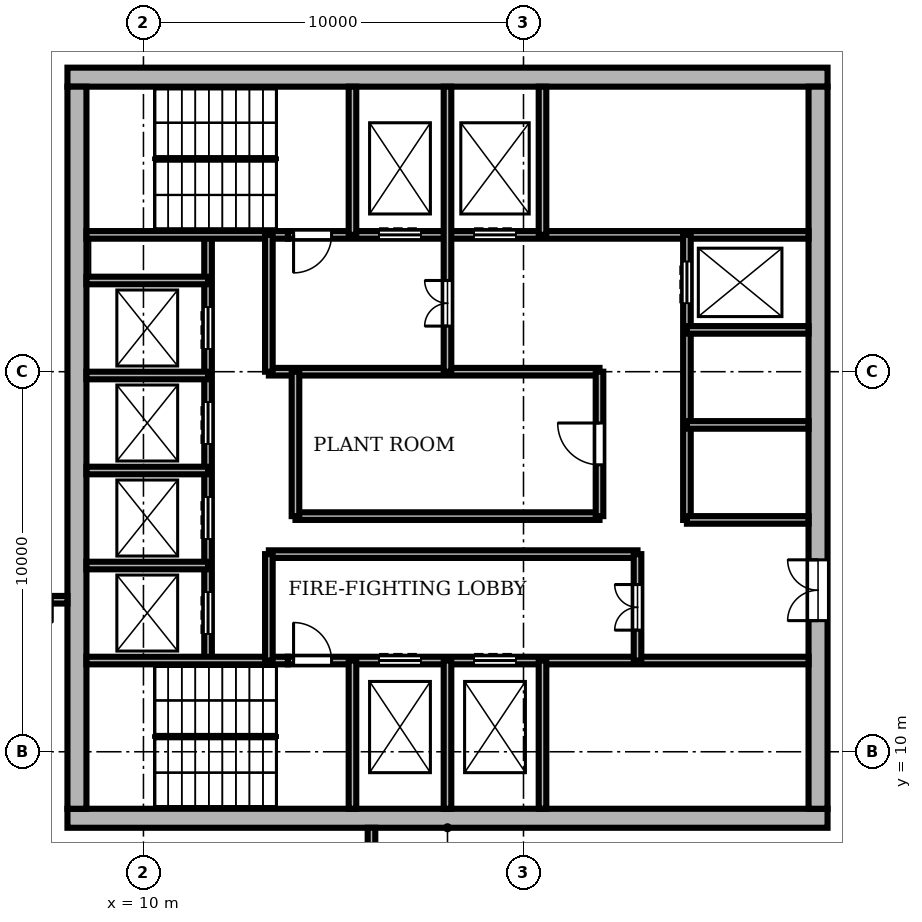
"""IFC4 building model, lengths in metres.
Left out: names, types, materials, properties, quantities, classifications, styles, units other than length and angle.
Written with IfcOpenShell. Run it as: python <this file> out.ifc"""

import sys

from ifc_helpers import new_model, si_unit, direction, frame, frame_2d, origin, place, context, subcontext, project, spatial, rectangle, extrude, element, fill, save


model = new_model("IFC4")
c1 = context("Model", 3, precision=1e-05, world=origin(), true_north=direction((0.0, 1.0)))
c2 = subcontext(c1, "Body", "Model", "MODEL_VIEW")
j1 = project(units=[si_unit("LENGTHUNIT", "METRE"), si_unit("PLANEANGLEUNIT", "RADIAN")], contexts=[c1])
p1 = place(None, origin())
s1 = spatial("IfcSite", under=j1, at=p1, CompositionType="ELEMENT")
p2 = place(p1, origin())
s2 = spatial("IfcBuilding", under=s1, at=p2, CompositionType="ELEMENT")
p3 = place(p2, frame((0.0, 0.0, 352.8)))
s3 = spatial("IfcBuildingStorey", under=s2, at=p3, CompositionType="ELEMENT", Elevation=352.8)
p4 = place(p3, frame((8.0, 8.25, 0.0), z_axis=(0.0, 0.0, 1.0), x_axis=(1.0, 0.0, 0.0)))
e1 = element("IfcWall", 1, at=p4, inside=s3, PredefinedType="SHEAR", context=c2, shape_type="SweptSolid", body=[
    extrude(rectangle(XDim=20.0, YDim=0.5, at=frame_2d((10.0, 0.0))), origin(), (0.0, 0.0, 1.0), 5.4),
])
p5 = place(p3, frame((27.75, 8.5, 0.0), z_axis=(0.0, 0.0, 1.0), x_axis=(0.0, 1.0, 0.0)))
e2 = element("IfcWall", 2, at=p5, inside=s3, PredefinedType="SHEAR", context=c2, shape_type="SweptSolid", body=[
    extrude(rectangle(XDim=19.0, YDim=0.5, at=frame_2d((9.5, 0.0))), origin(), (0.0, 0.0, 1.0), 5.4),
])
p6 = place(p5, frame((4.95, 0.0, 0.0)))
e3 = element("IfcOpeningElement", 3, at=p6, cuts=e2, PredefinedType="OPENING", context=c2, shape_type="SweptSolid", body=[
    extrude(rectangle(XDim=1.6, YDim=2.1, at=frame_2d((0.8, 1.05))), frame((0.0, 0.26, 0.0), z_axis=(0.0, -1.0, 0.0), x_axis=(1.0, 0.0, 0.0)), (0.0, 0.0, 1.0), 0.52),
])
p7 = place(p3, frame((28.0, 27.75, 0.0), z_axis=(0.0, 0.0, 1.0), x_axis=(-1.0, 0.0, 0.0)))
e4 = element("IfcWall", 4, at=p7, inside=s3, PredefinedType="SHEAR", context=c2, shape_type="SweptSolid", body=[
    extrude(rectangle(XDim=20.0, YDim=0.5, at=frame_2d((10.0, 0.0))), origin(), (0.0, 0.0, 1.0), 5.4),
])
p8 = place(p3, frame((8.25, 27.5, 0.0), z_axis=(0.0, 0.0, 1.0), x_axis=(0.0, -1.0, 0.0)))
e5 = element("IfcWall", 5, at=p8, inside=s3, PredefinedType="SHEAR", context=c2, shape_type="SweptSolid", body=[
    extrude(rectangle(XDim=19.0, YDim=0.5, at=frame_2d((9.5, 0.0))), origin(), (0.0, 0.0, 1.0), 5.4),
])
p9 = place(p3, frame((8.5, 12.4, 0.0), z_axis=(0.0, 0.0, 1.0), x_axis=(1.0, 0.0, 0.0)))
e6 = element("IfcWall", 6, at=p9, inside=s3, PredefinedType="SHEAR", context=c2, shape_type="SweptSolid", body=[
    extrude(rectangle(XDim=5.3, YDim=0.2, at=frame_2d((2.65, 0.0))), origin(), (0.0, 0.0, 1.0), 5.0),
])
p10 = place(p3, frame((13.8, 12.4, 0.0), z_axis=(0.0, 0.0, 1.0), x_axis=(1.0, 0.0, 0.0)))
e7 = element("IfcWall", 7, at=p10, inside=s3, PredefinedType="SHEAR", context=c2, shape_type="SweptSolid", body=[
    extrude(rectangle(XDim=13.7, YDim=0.2, at=frame_2d((6.85, 0.0))), origin(), (0.0, 0.0, 1.0), 5.0),
])
p11 = place(p10, frame((2.4, 0.0, 0.0)))
e8 = element("IfcOpeningElement", 8, at=p11, cuts=e7, PredefinedType="OPENING", context=c2, shape_type="SweptSolid", body=[
    extrude(rectangle(XDim=1.1, YDim=2.1, at=frame_2d((0.55, 1.05))), frame((0.0, 0.11, 0.0), z_axis=(0.0, -1.0, 0.0), x_axis=(1.0, 0.0, 0.0)), (0.0, 0.0, 1.0), 0.22),
])
p12 = place(p10, frame((4.9, 0.0, 0.0)))
e9 = element("IfcOpeningElement", 9, at=p12, cuts=e7, PredefinedType="OPENING", context=c2, shape_type="SweptSolid", body=[
    extrude(rectangle(XDim=1.1, YDim=2.1, at=frame_2d((0.55, 1.05))), frame((0.0, 0.11, 0.0), z_axis=(0.0, -1.0, 0.0), x_axis=(1.0, 0.0, 0.0)), (0.0, 0.0, 1.0), 0.22),
])
p13 = place(p10, frame((0.15, 0.0, 0.0)))
e10 = element("IfcOpeningElement", 10, at=p13, cuts=e7, PredefinedType="OPENING", context=c2, shape_type="SweptSolid", body=[
    extrude(rectangle(XDim=1.0, YDim=2.1, at=frame_2d((0.5, 1.05))), frame((0.0, 0.11, 0.0), z_axis=(0.0, -1.0, 0.0), x_axis=(1.0, 0.0, 0.0)), (0.0, 0.0, 1.0), 0.22),
])
p14 = place(p3, frame((8.5, 14.9, 0.0), z_axis=(0.0, 0.0, 1.0), x_axis=(1.0, 0.0, 0.0)))
e11 = element("IfcWall", 11, at=p14, inside=s3, PredefinedType="SHEAR", context=c2, shape_type="SweptSolid", body=[
    extrude(rectangle(XDim=3.2, YDim=0.2, at=frame_2d((1.6, 0.0))), origin(), (0.0, 0.0, 1.0), 5.0),
])
p15 = place(p3, frame((13.3, 15.2, 0.0), z_axis=(0.0, 0.0, 1.0), x_axis=(1.0, 0.0, 0.0)))
e12 = element("IfcWall", 12, at=p15, inside=s3, PredefinedType="SHEAR", context=c2, shape_type="SweptSolid", body=[
    extrude(rectangle(XDim=9.7, YDim=0.2, at=frame_2d((4.85, 0.0))), origin(), (0.0, 0.0, 1.0), 5.0),
])
p16 = place(p3, frame((24.3, 16.1, 0.0), z_axis=(0.0, 0.0, 1.0), x_axis=(1.0, 0.0, 0.0)))
e13 = element("IfcWall", 13, at=p16, inside=s3, PredefinedType="SHEAR", context=c2, shape_type="SweptSolid", body=[
    extrude(rectangle(XDim=3.2, YDim=0.2, at=frame_2d((1.6, 0.0))), origin(), (0.0, 0.0, 1.0), 5.0),
])
p17 = place(p3, frame((14.0, 16.2, 0.0), z_axis=(0.0, 0.0, 1.0), x_axis=(1.0, 0.0, 0.0)))
e14 = element("IfcWall", 14, at=p17, inside=s3, PredefinedType="SHEAR", context=c2, shape_type="SweptSolid", body=[
    extrude(rectangle(XDim=8.0, YDim=0.2, at=frame_2d((4.0, 0.0))), origin(), (0.0, 0.0, 1.0), 5.0),
])
for number, where, z_axis, x_axis in (
    (15, (8.5, 17.4, 0.0), (0.0, 0.0, 1.0), (1.0, 0.0, 0.0)),
    (16, (24.3, 18.6, 0.0), (0.0, 0.0, 1.0), (1.0, 0.0, 0.0)),
    (17, (8.5, 19.9, 0.0), (0.0, 0.0, 1.0), (1.0, 0.0, 0.0)),
):
    element("IfcWall", number, at=place(p3, frame(where, z_axis=z_axis, x_axis=x_axis)), inside=s3, PredefinedType="SHEAR", context=c2, shape_type="SweptSolid", body=[
        extrude(rectangle(XDim=3.2, YDim=0.2, at=frame_2d((1.6, 0.0))), origin(), (0.0, 0.0, 1.0), 5.0),
    ])
p18 = place(p3, frame((13.3, 20.0, 0.0), z_axis=(0.0, 0.0, 1.0), x_axis=(1.0, 0.0, 0.0)))
e18 = element("IfcWall", 18, at=p18, inside=s3, PredefinedType="SHEAR", context=c2, shape_type="SweptSolid", body=[
    extrude(rectangle(XDim=8.7, YDim=0.2, at=frame_2d((4.35, 0.0))), origin(), (0.0, 0.0, 1.0), 5.0),
])
for number, where, z_axis, x_axis in (
    (19, (24.3, 21.1, 0.0), (0.0, 0.0, 1.0), (1.0, 0.0, 0.0)),
    (20, (8.5, 22.4, 0.0), (0.0, 0.0, 1.0), (1.0, 0.0, 0.0)),
):
    element("IfcWall", number, at=place(p3, frame(where, z_axis=z_axis, x_axis=x_axis)), inside=s3, PredefinedType="SHEAR", context=c2, shape_type="SweptSolid", body=[
        extrude(rectangle(XDim=3.2, YDim=0.2, at=frame_2d((1.6, 0.0))), origin(), (0.0, 0.0, 1.0), 5.0),
    ])
p19 = place(p3, frame((8.5, 23.6, 0.0), z_axis=(0.0, 0.0, 1.0), x_axis=(1.0, 0.0, 0.0)))
e21 = element("IfcWall", 21, at=p19, inside=s3, PredefinedType="SHEAR", context=c2, shape_type="SweptSolid", body=[
    extrude(rectangle(XDim=5.3, YDim=0.2, at=frame_2d((2.65, 0.0))), origin(), (0.0, 0.0, 1.0), 5.0),
])
p20 = place(p3, frame((13.8, 23.6, 0.0), z_axis=(0.0, 0.0, 1.0), x_axis=(1.0, 0.0, 0.0)))
e22 = element("IfcWall", 22, at=p20, inside=s3, PredefinedType="SHEAR", context=c2, shape_type="SweptSolid", body=[
    extrude(rectangle(XDim=13.7, YDim=0.2, at=frame_2d((6.85, 0.0))), origin(), (0.0, 0.0, 1.0), 5.0),
])
p21 = place(p20, frame((2.4, 0.0, 0.0)))
e23 = element("IfcOpeningElement", 23, at=p21, cuts=e22, PredefinedType="OPENING", context=c2, shape_type="SweptSolid", body=[
    extrude(rectangle(XDim=1.1, YDim=2.1, at=frame_2d((0.55, 1.05))), frame((0.0, 0.11, 0.0), z_axis=(0.0, -1.0, 0.0), x_axis=(1.0, 0.0, 0.0)), (0.0, 0.0, 1.0), 0.22),
])
p22 = place(p20, frame((4.9, 0.0, 0.0)))
e24 = element("IfcOpeningElement", 24, at=p22, cuts=e22, PredefinedType="OPENING", context=c2, shape_type="SweptSolid", body=[
    extrude(rectangle(XDim=1.1, YDim=2.1, at=frame_2d((0.55, 1.05))), frame((0.0, 0.11, 0.0), z_axis=(0.0, -1.0, 0.0), x_axis=(1.0, 0.0, 0.0)), (0.0, 0.0, 1.0), 0.22),
])
p23 = place(p20, frame((0.15, 0.0, 0.0)))
e25 = element("IfcOpeningElement", 25, at=p23, cuts=e22, PredefinedType="OPENING", context=c2, shape_type="SweptSolid", body=[
    extrude(rectangle(XDim=1.0, YDim=2.1, at=frame_2d((0.5, 1.05))), frame((0.0, 0.11, 0.0), z_axis=(0.0, -1.0, 0.0), x_axis=(1.0, 0.0, 0.0)), (0.0, 0.0, 1.0), 0.22),
])
p24 = place(p3, frame((11.7, 12.4, 0.0), z_axis=(0.0, 0.0, 1.0), x_axis=(0.0, 1.0, 0.0)))
e26 = element("IfcWall", 26, at=p24, inside=s3, PredefinedType="SHEAR", context=c2, shape_type="SweptSolid", body=[
    extrude(rectangle(XDim=11.2, YDim=0.2, at=frame_2d((5.6, 0.0))), origin(), (0.0, 0.0, 1.0), 5.0),
])
p25 = place(p24, frame((0.7, 0.0, 0.0)))
e27 = element("IfcOpeningElement", 27, at=p25, cuts=e26, PredefinedType="OPENING", context=c2, shape_type="SweptSolid", body=[
    extrude(rectangle(XDim=1.1, YDim=2.1, at=frame_2d((0.55, 1.05))), frame((0.0, 0.11, 0.0), z_axis=(0.0, -1.0, 0.0), x_axis=(1.0, 0.0, 0.0)), (0.0, 0.0, 1.0), 0.22),
])
p26 = place(p24, frame((3.2, 0.0, 0.0)))
e28 = element("IfcOpeningElement", 28, at=p26, cuts=e26, PredefinedType="OPENING", context=c2, shape_type="SweptSolid", body=[
    extrude(rectangle(XDim=1.1, YDim=2.1, at=frame_2d((0.55, 1.05))), frame((0.0, 0.11, 0.0), z_axis=(0.0, -1.0, 0.0), x_axis=(1.0, 0.0, 0.0)), (0.0, 0.0, 1.0), 0.22),
])
p27 = place(p24, frame((5.7, 0.0, 0.0)))
e29 = element("IfcOpeningElement", 29, at=p27, cuts=e26, PredefinedType="OPENING", context=c2, shape_type="SweptSolid", body=[
    extrude(rectangle(XDim=1.1, YDim=2.1, at=frame_2d((0.55, 1.05))), frame((0.0, 0.11, 0.0), z_axis=(0.0, -1.0, 0.0), x_axis=(1.0, 0.0, 0.0)), (0.0, 0.0, 1.0), 0.22),
])
p28 = place(p24, frame((8.2, 0.0, 0.0)))
e30 = element("IfcOpeningElement", 30, at=p28, cuts=e26, PredefinedType="OPENING", context=c2, shape_type="SweptSolid", body=[
    extrude(rectangle(XDim=1.1, YDim=2.1, at=frame_2d((0.55, 1.05))), frame((0.0, 0.11, 0.0), z_axis=(0.0, -1.0, 0.0), x_axis=(1.0, 0.0, 0.0)), (0.0, 0.0, 1.0), 0.22),
])
p29 = place(p3, frame((13.3, 12.4, 0.0), z_axis=(0.0, 0.0, 1.0), x_axis=(0.0, 1.0, 0.0)))
e31 = element("IfcWall", 31, at=p29, inside=s3, PredefinedType="SHEAR", context=c2, shape_type="SweptSolid", body=[
    extrude(rectangle(XDim=2.8, YDim=0.2, at=frame_2d((1.4, 0.0))), origin(), (0.0, 0.0, 1.0), 5.0),
])
p30 = place(p3, frame((13.3, 20.0, 0.0), z_axis=(0.0, 0.0, 1.0), x_axis=(0.0, 1.0, 0.0)))
e32 = element("IfcWall", 32, at=p30, inside=s3, PredefinedType="SHEAR", context=c2, shape_type="SweptSolid", body=[
    extrude(rectangle(XDim=3.6, YDim=0.2, at=frame_2d((1.8, 0.0))), origin(), (0.0, 0.0, 1.0), 5.0),
])
p31 = place(p3, frame((14.0, 16.2, 0.0), z_axis=(0.0, 0.0, 1.0), x_axis=(0.0, 1.0, 0.0)))
e33 = element("IfcWall", 33, at=p31, inside=s3, PredefinedType="SHEAR", context=c2, shape_type="SweptSolid", body=[
    extrude(rectangle(XDim=3.8, YDim=0.2, at=frame_2d((1.9, 0.0))), origin(), (0.0, 0.0, 1.0), 5.0),
])
for number, where, z_axis, x_axis in (
    (34, (15.5, 8.5, 0.0), (0.0, 0.0, 1.0), (0.0, 1.0, 0.0)),
    (35, (15.5, 23.6, 0.0), (0.0, 0.0, 1.0), (0.0, 1.0, 0.0)),
    (36, (18.0, 8.5, 0.0), (0.0, 0.0, 1.0), (0.0, 1.0, 0.0)),
):
    element("IfcWall", number, at=place(p3, frame(where, z_axis=z_axis, x_axis=x_axis)), inside=s3, PredefinedType="SHEAR", context=c2, shape_type="SweptSolid", body=[
        extrude(rectangle(XDim=3.9, YDim=0.2, at=frame_2d((1.95, 0.0))), origin(), (0.0, 0.0, 1.0), 5.0),
    ])
p32 = place(p3, frame((18.0, 20.0, 0.0), z_axis=(0.0, 0.0, 1.0), x_axis=(0.0, 1.0, 0.0)))
e37 = element("IfcWall", 37, at=p32, inside=s3, PredefinedType="SHEAR", context=c2, shape_type="SweptSolid", body=[
    extrude(rectangle(XDim=7.5, YDim=0.2, at=frame_2d((3.75, 0.0))), origin(), (0.0, 0.0, 1.0), 5.0),
])
p33 = place(p32, frame((1.2, 0.0, 0.0)))
e38 = element("IfcOpeningElement", 38, at=p33, cuts=e37, PredefinedType="OPENING", context=c2, shape_type="SweptSolid", body=[
    extrude(rectangle(XDim=1.2, YDim=2.1, at=frame_2d((0.6, 1.05))), frame((0.0, 0.11, 0.0), z_axis=(0.0, -1.0, 0.0), x_axis=(1.0, 0.0, 0.0)), (0.0, 0.0, 1.0), 0.22),
])
for number, where, z_axis, x_axis in (
    (39, (20.5, 8.5, 0.0), (0.0, 0.0, 1.0), (0.0, 1.0, 0.0)),
    (40, (20.5, 23.6, 0.0), (0.0, 0.0, 1.0), (0.0, 1.0, 0.0)),
):
    element("IfcWall", number, at=place(p3, frame(where, z_axis=z_axis, x_axis=x_axis)), inside=s3, PredefinedType="SHEAR", context=c2, shape_type="SweptSolid", body=[
        extrude(rectangle(XDim=3.9, YDim=0.2, at=frame_2d((1.95, 0.0))), origin(), (0.0, 0.0, 1.0), 5.0),
    ])
p34 = place(p3, frame((22.0, 16.2, 0.0), z_axis=(0.0, 0.0, 1.0), x_axis=(0.0, 1.0, 0.0)))
e41 = element("IfcWall", 41, at=p34, inside=s3, PredefinedType="SHEAR", context=c2, shape_type="SweptSolid", body=[
    extrude(rectangle(XDim=3.8, YDim=0.2, at=frame_2d((1.9, 0.0))), origin(), (0.0, 0.0, 1.0), 5.0),
])
p35 = place(p34, frame((1.35, 0.0, 0.0)))
e42 = element("IfcOpeningElement", 42, at=p35, cuts=e41, PredefinedType="OPENING", context=c2, shape_type="SweptSolid", body=[
    extrude(rectangle(XDim=1.1, YDim=2.1, at=frame_2d((0.55, 1.05))), frame((0.0, 0.11, 0.0), z_axis=(0.0, -1.0, 0.0), x_axis=(1.0, 0.0, 0.0)), (0.0, 0.0, 1.0), 0.22),
])
p36 = place(p3, frame((23.0, 12.4, 0.0), z_axis=(0.0, 0.0, 1.0), x_axis=(0.0, 1.0, 0.0)))
e43 = element("IfcWall", 43, at=p36, inside=s3, PredefinedType="SHEAR", context=c2, shape_type="SweptSolid", body=[
    extrude(rectangle(XDim=2.8, YDim=0.2, at=frame_2d((1.4, 0.0))), origin(), (0.0, 0.0, 1.0), 5.0),
])
p37 = place(p36, frame((0.8, 0.0, 0.0)))
e44 = element("IfcOpeningElement", 44, at=p37, cuts=e43, PredefinedType="OPENING", context=c2, shape_type="SweptSolid", body=[
    extrude(rectangle(XDim=1.2, YDim=2.1, at=frame_2d((0.6, 1.05))), frame((0.0, 0.11, 0.0), z_axis=(0.0, -1.0, 0.0), x_axis=(1.0, 0.0, 0.0)), (0.0, 0.0, 1.0), 0.22),
])
p38 = place(p3, frame((24.3, 16.1, 0.0), z_axis=(0.0, 0.0, 1.0), x_axis=(0.0, 1.0, 0.0)))
e45 = element("IfcWall", 45, at=p38, inside=s3, PredefinedType="SHEAR", context=c2, shape_type="SweptSolid", body=[
    extrude(rectangle(XDim=7.5, YDim=0.2, at=frame_2d((3.75, 0.0))), origin(), (0.0, 0.0, 1.0), 5.0),
])
p39 = place(p38, frame((5.7, 0.0, 0.0)))
e46 = element("IfcOpeningElement", 46, at=p39, cuts=e45, PredefinedType="OPENING", context=c2, shape_type="SweptSolid", body=[
    extrude(rectangle(XDim=1.1, YDim=2.1, at=frame_2d((0.55, 1.05))), frame((0.0, 0.11, 0.0), z_axis=(0.0, -1.0, 0.0), x_axis=(1.0, 0.0, 0.0)), (0.0, 0.0, 1.0), 0.22),
])
p40 = place(p3, frame((6.0, 14.0, 0.0), z_axis=(0.0, 0.0, 1.0), x_axis=(1.0, 0.0, 0.0)))
e47 = element("IfcWall", 47, at=p40, inside=s3, PredefinedType="PARTITIONING", context=c2, shape_type="SweptSolid", body=[
    extrude(rectangle(XDim=2.0, YDim=0.2, at=frame_2d((1.0, 0.0))), origin(), (0.0, 0.0, 1.0), 5.0),
])
p41 = place(p40, frame((0.4, 0.0, 0.0)))
e48 = element("IfcOpeningElement", 48, at=p41, cuts=e47, PredefinedType="OPENING", context=c2, shape_type="SweptSolid", body=[
    extrude(rectangle(XDim=1.2, YDim=2.1, at=frame_2d((0.6, 1.05))), frame((0.0, 0.11, 0.0), z_axis=(0.0, -1.0, 0.0), x_axis=(1.0, 0.0, 0.0)), (0.0, 0.0, 1.0), 0.22),
])
p42 = place(p3, frame((16.0, 5.5, 0.0), z_axis=(0.0, 0.0, 1.0), x_axis=(0.0, 1.0, 0.0)))
e49 = element("IfcWall", 49, at=p42, inside=s3, PredefinedType="PARTITIONING", context=c2, shape_type="SweptSolid", body=[
    extrude(rectangle(XDim=2.5, YDim=0.2, at=frame_2d((1.25, 0.0))), origin(), (0.0, 0.0, 1.0), 5.0),
])
p43 = place(p25, origin())
e50 = element("IfcDoor", 50, at=p43, inside=s3, OperationType="DOUBLE_DOOR_SLIDING", PredefinedType="DOOR", context=c2, shape_type="SweptSolid", body=[
    extrude(rectangle(XDim=1.1, YDim=2.1, at=frame_2d((0.55, 1.05))), frame((0.0, 0.025, 0.0), z_axis=(0.0, -1.0, 0.0), x_axis=(1.0, 0.0, 0.0)), (0.0, 0.0, 1.0), 0.05),
])
fill(e27, e50)
p44 = place(p26, origin())
e51 = element("IfcDoor", 51, at=p44, inside=s3, OperationType="DOUBLE_DOOR_SLIDING", PredefinedType="DOOR", context=c2, shape_type="SweptSolid", body=[
    extrude(rectangle(XDim=1.1, YDim=2.1, at=frame_2d((0.55, 1.05))), frame((0.0, 0.025, 0.0), z_axis=(0.0, -1.0, 0.0), x_axis=(1.0, 0.0, 0.0)), (0.0, 0.0, 1.0), 0.05),
])
fill(e28, e51)
p45 = place(p27, origin())
e52 = element("IfcDoor", 52, at=p45, inside=s3, OperationType="DOUBLE_DOOR_SLIDING", PredefinedType="DOOR", context=c2, shape_type="SweptSolid", body=[
    extrude(rectangle(XDim=1.1, YDim=2.1, at=frame_2d((0.55, 1.05))), frame((0.0, 0.025, 0.0), z_axis=(0.0, -1.0, 0.0), x_axis=(1.0, 0.0, 0.0)), (0.0, 0.0, 1.0), 0.05),
])
fill(e29, e52)
p46 = place(p28, origin())
e53 = element("IfcDoor", 53, at=p46, inside=s3, OperationType="DOUBLE_DOOR_SLIDING", PredefinedType="DOOR", context=c2, shape_type="SweptSolid", body=[
    extrude(rectangle(XDim=1.1, YDim=2.1, at=frame_2d((0.55, 1.05))), frame((0.0, 0.025, 0.0), z_axis=(0.0, -1.0, 0.0), x_axis=(1.0, 0.0, 0.0)), (0.0, 0.0, 1.0), 0.05),
])
fill(e30, e53)
p47 = place(p39, origin())
e54 = element("IfcDoor", 54, at=p47, inside=s3, OperationType="DOUBLE_DOOR_SLIDING", PredefinedType="DOOR", context=c2, shape_type="SweptSolid", body=[
    extrude(rectangle(XDim=1.1, YDim=2.1, at=frame_2d((0.55, 1.05))), frame((0.0, 0.025, 0.0), z_axis=(0.0, -1.0, 0.0), x_axis=(1.0, 0.0, 0.0)), (0.0, 0.0, 1.0), 0.05),
])
fill(e46, e54)
p48 = place(p11, origin())
e55 = element("IfcDoor", 55, at=p48, inside=s3, OperationType="DOUBLE_DOOR_SLIDING", PredefinedType="DOOR", context=c2, shape_type="SweptSolid", body=[
    extrude(rectangle(XDim=1.1, YDim=2.1, at=frame_2d((0.55, 1.05))), frame((0.0, 0.025, 0.0), z_axis=(0.0, -1.0, 0.0), x_axis=(1.0, 0.0, 0.0)), (0.0, 0.0, 1.0), 0.05),
])
fill(e8, e55)
p49 = place(p12, origin())
e56 = element("IfcDoor", 56, at=p49, inside=s3, OperationType="DOUBLE_DOOR_SLIDING", PredefinedType="DOOR", context=c2, shape_type="SweptSolid", body=[
    extrude(rectangle(XDim=1.1, YDim=2.1, at=frame_2d((0.55, 1.05))), frame((0.0, 0.025, 0.0), z_axis=(0.0, -1.0, 0.0), x_axis=(1.0, 0.0, 0.0)), (0.0, 0.0, 1.0), 0.05),
])
fill(e9, e56)
p50 = place(p21, origin())
e57 = element("IfcDoor", 57, at=p50, inside=s3, OperationType="DOUBLE_DOOR_SLIDING", PredefinedType="DOOR", context=c2, shape_type="SweptSolid", body=[
    extrude(rectangle(XDim=1.1, YDim=2.1, at=frame_2d((0.55, 1.05))), frame((0.0, 0.025, 0.0), z_axis=(0.0, -1.0, 0.0), x_axis=(1.0, 0.0, 0.0)), (0.0, 0.0, 1.0), 0.05),
])
fill(e23, e57)
p51 = place(p22, origin())
e58 = element("IfcDoor", 58, at=p51, inside=s3, OperationType="DOUBLE_DOOR_SLIDING", PredefinedType="DOOR", context=c2, shape_type="SweptSolid", body=[
    extrude(rectangle(XDim=1.1, YDim=2.1, at=frame_2d((0.55, 1.05))), frame((0.0, 0.025, 0.0), z_axis=(0.0, -1.0, 0.0), x_axis=(1.0, 0.0, 0.0)), (0.0, 0.0, 1.0), 0.05),
])
fill(e24, e58)
p52 = place(p13, origin())
e59 = element("IfcDoor", 59, at=p52, inside=s3, OperationType="SINGLE_SWING_LEFT", PredefinedType="DOOR", context=c2, shape_type="SweptSolid", body=[
    extrude(rectangle(XDim=1.0, YDim=2.1, at=frame_2d((0.5, 1.05))), frame((0.0, 0.025, 0.0), z_axis=(0.0, -1.0, 0.0), x_axis=(1.0, 0.0, 0.0)), (0.0, 0.0, 1.0), 0.05),
])
fill(e10, e59)
p53 = place(p23, frame((1.0, 0.0, 0.0), z_axis=(0.0, 0.0, 1.0), x_axis=(-1.0, 0.0, 0.0)))
e60 = element("IfcDoor", 60, at=p53, inside=s3, OperationType="SINGLE_SWING_RIGHT", PredefinedType="DOOR", context=c2, shape_type="SweptSolid", body=[
    extrude(rectangle(XDim=1.0, YDim=2.1, at=frame_2d((0.5, 1.05))), frame((0.0, 0.025, 0.0), z_axis=(0.0, -1.0, 0.0), x_axis=(1.0, 0.0, 0.0)), (0.0, 0.0, 1.0), 0.05),
])
fill(e25, e60)
p54 = place(p37, origin())
e61 = element("IfcDoor", 61, at=p54, inside=s3, OperationType="DOUBLE_DOOR_SINGLE_SWING", PredefinedType="DOOR", context=c2, shape_type="SweptSolid", body=[
    extrude(rectangle(XDim=1.2, YDim=2.1, at=frame_2d((0.6, 1.05))), frame((0.0, 0.025, 0.0), z_axis=(0.0, -1.0, 0.0), x_axis=(1.0, 0.0, 0.0)), (0.0, 0.0, 1.0), 0.05),
])
fill(e44, e61)
p55 = place(p33, origin())
e62 = element("IfcDoor", 62, at=p55, inside=s3, OperationType="DOUBLE_DOOR_SINGLE_SWING", PredefinedType="DOOR", context=c2, shape_type="SweptSolid", body=[
    extrude(rectangle(XDim=1.2, YDim=2.1, at=frame_2d((0.6, 1.05))), frame((0.0, 0.025, 0.0), z_axis=(0.0, -1.0, 0.0), x_axis=(1.0, 0.0, 0.0)), (0.0, 0.0, 1.0), 0.05),
])
fill(e38, e62)
p56 = place(p35, origin())
e63 = element("IfcDoor", 63, at=p56, inside=s3, OperationType="SINGLE_SWING_RIGHT", PredefinedType="DOOR", context=c2, shape_type="SweptSolid", body=[
    extrude(rectangle(XDim=1.1, YDim=2.1, at=frame_2d((0.55, 1.05))), frame((0.0, 0.025, 0.0), z_axis=(0.0, -1.0, 0.0), x_axis=(1.0, 0.0, 0.0)), (0.0, 0.0, 1.0), 0.05),
])
fill(e42, e63)
p57 = place(p6, origin())
e64 = element("IfcDoor", 64, at=p57, inside=s3, OperationType="DOUBLE_DOOR_SINGLE_SWING", PredefinedType="DOOR", context=c2, shape_type="SweptSolid", body=[
    extrude(rectangle(XDim=1.6, YDim=2.1, at=frame_2d((0.8, 1.05))), frame((0.0, 0.025, 0.0), z_axis=(0.0, -1.0, 0.0), x_axis=(1.0, 0.0, 0.0)), (0.0, 0.0, 1.0), 0.05),
])
fill(e3, e64)
save(model, sys.argv[1])
